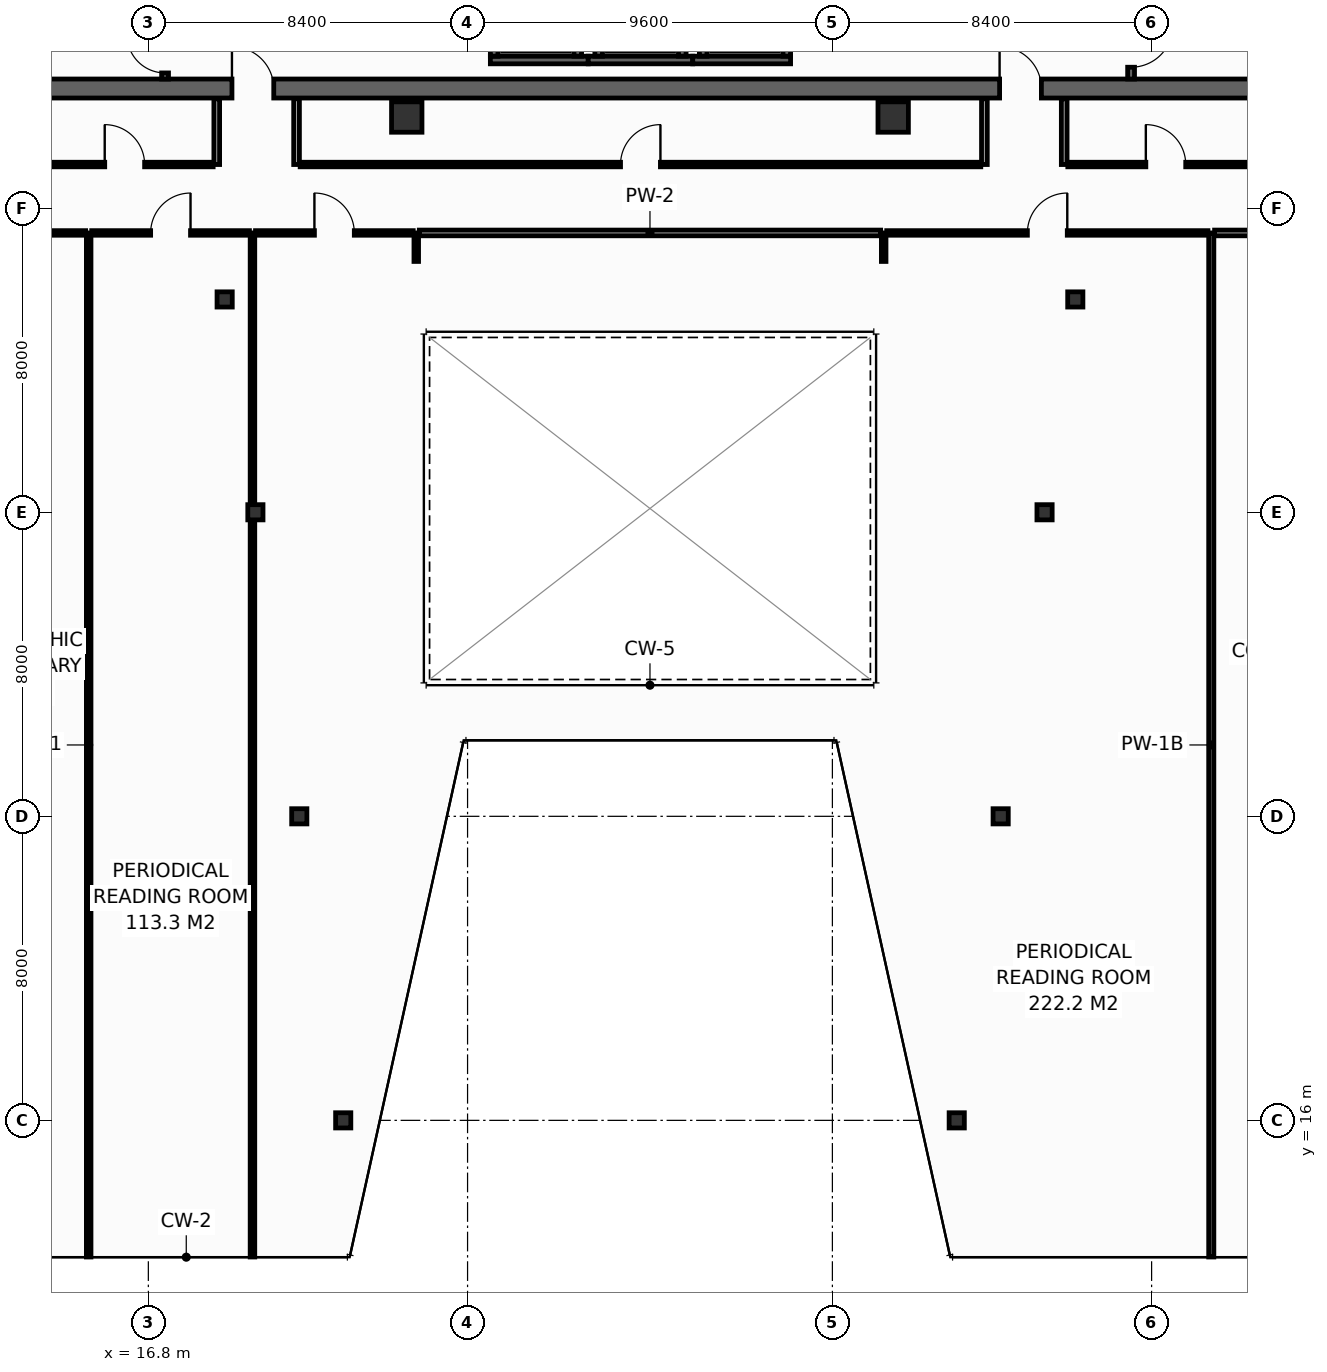
"""IFC4 building model, lengths in metres.
Left out: names, types, materials, properties, quantities, classifications, styles, units other than length and angle.
Written with IfcOpenShell. Run it as: python <this file> out.ifc"""

import sys

from ifc_helpers import new_model, si_unit, direction, frame, frame_2d, origin, origin_2d, place, context, subcontext, project, spatial, rectangle, hollow_rectangle, extrude, element, fill, save


model = new_model("IFC4")
c1 = context("Model", 3, precision=1e-05, world=origin(), true_north=direction((0.0, 1.0)))
c2 = subcontext(c1, "Body", "Model", "MODEL_VIEW")
j1 = project(units=[si_unit("LENGTHUNIT", "METRE"), si_unit("PLANEANGLEUNIT", "RADIAN")], contexts=[c1])
p1 = place(None, origin())
s1 = spatial("IfcSite", under=j1, at=p1, CompositionType="ELEMENT")
p2 = place(p1, origin())
s2 = spatial("IfcBuilding", under=s1, at=p2, CompositionType="ELEMENT")
p3 = place(p2, frame((0.0, 0.0, 198.0)))
s3 = spatial("IfcBuildingStorey", under=s2, at=p3, CompositionType="ELEMENT", Elevation=198.0)
p4 = place(p3, frame((13.6, 43.15, 0.0), z_axis=(0.0, 0.0, 1.0), x_axis=(1.0, 0.0, 0.0)))
e1 = element("IfcWall", 1, at=p4, inside=s3, PredefinedType="SHEAR", context=c2, shape_type="SweptSolid", body=[
    extrude(rectangle(XDim=32.7, YDim=0.5, at=frame_2d((16.35, 0.0))), origin(), (0.0, 0.0, 1.0), 3.55),
])
p5 = place(p4, frame((5.4, 0.0, 0.0)))
e2 = element("IfcOpeningElement", 2, at=p5, cuts=e1, PredefinedType="OPENING", context=c2, shape_type="SweptSolid", body=[
    extrude(rectangle(XDim=1.1, YDim=2.15, at=frame_2d((0.55, 1.075))), frame((0.0, 0.26, 0.0), z_axis=(0.0, -1.0, 0.0), x_axis=(1.0, 0.0, 0.0)), (0.0, 0.0, 1.0), 0.52),
])
p6 = place(p4, frame((25.6, 0.0, 0.0)))
e3 = element("IfcOpeningElement", 3, at=p6, cuts=e1, PredefinedType="OPENING", context=c2, shape_type="SweptSolid", body=[
    extrude(rectangle(XDim=1.1, YDim=2.15, at=frame_2d((0.55, 1.075))), frame((0.0, 0.26, 0.0), z_axis=(0.0, -1.0, 0.0), x_axis=(1.0, 0.0, 0.0)), (0.0, 0.0, 1.0), 0.52),
])
for number, where, z_axis, x_axis in (
    (4, (23.6, 42.4, 0.0), (0.0, 0.0, 1.0), (1.0, 0.0, 0.0)),
    (5, (36.4, 42.4, 0.0), (0.0, 0.0, 1.0), (1.0, 0.0, 0.0)),
):
    element("IfcColumn", number, at=place(p3, frame(where, z_axis=z_axis, x_axis=x_axis)), inside=s3, PredefinedType="COLUMN", context=c2, shape_type="SweptSolid", body=[
        extrude(hollow_rectangle(XDim=0.8, YDim=0.8, WallThickness=0.036, at=origin_2d()), origin(), (0.0, 0.0, 1.0), 3.8),
    ])
for number, where, z_axis, x_axis in (
    (6, (21.928, 16.0, 0.0), (0.0, 0.0, 1.0), (1.0, 0.0, 0.0)),
    (7, (38.072, 16.0, 0.0), (0.0, 0.0, 1.0), (1.0, 0.0, 0.0)),
    (8, (20.772, 24.0, 0.0), (0.0, 0.0, 1.0), (1.0, 0.0, 0.0)),
    (9, (39.228, 24.0, 0.0), (0.0, 0.0, 1.0), (1.0, 0.0, 0.0)),
    (10, (19.617, 32.0, 0.0), (0.0, 0.0, 1.0), (1.0, 0.0, 0.0)),
    (11, (40.383, 32.0, 0.0), (0.0, 0.0, 1.0), (1.0, 0.0, 0.0)),
    (12, (18.808, 37.6, 0.0), (0.0, 0.0, 1.0), (1.0, 0.0, 0.0)),
    (13, (41.192, 37.6, 0.0), (0.0, 0.0, 1.0), (1.0, 0.0, 0.0)),
):
    element("IfcColumn", number, at=place(p3, frame(where, z_axis=z_axis, x_axis=x_axis)), inside=s3, PredefinedType="COLUMN", context=c2, shape_type="SweptSolid", body=[
        extrude(hollow_rectangle(XDim=0.4, YDim=0.4, WallThickness=0.016, at=origin_2d()), origin(), (0.0, 0.0, 1.0), 3.8),
    ])
p7 = place(p3, frame((25.8, 43.9, 0.0), z_axis=(0.0, 0.0, 1.0), x_axis=(1.0, 0.0, 0.0)))
e14 = element("IfcWall", 14, at=p7, inside=s3, PredefinedType="SHEAR", context=c2, shape_type="SweptSolid", body=[
    extrude(rectangle(XDim=2.575, YDim=0.2, at=frame_2d((1.288, 0.0))), origin(), (0.0, 0.0, 1.0), 3.55),
])
for number, where, z_axis, x_axis in (
    (15, (25.9, 44.0, 0.0), (0.0, 0.0, 1.0), (0.0, 1.0, 0.0)),
    (16, (28.1, 44.0, 0.0), (0.0, 0.0, 1.0), (0.0, 1.0, 0.0)),
):
    element("IfcWall", number, at=place(p3, frame(where, z_axis=z_axis, x_axis=x_axis)), inside=s3, PredefinedType="SHEAR", context=c2, shape_type="SweptSolid", body=[
        extrude(rectangle(XDim=2.3, YDim=0.2, at=frame_2d((1.15, 0.0))), origin(), (0.0, 0.0, 1.0), 3.55),
    ])
p8 = place(p3, frame((28.375, 43.9, 0.0), z_axis=(0.0, 0.0, 1.0), x_axis=(1.0, 0.0, 0.0)))
e17 = element("IfcWall", 17, at=p8, inside=s3, PredefinedType="SHEAR", context=c2, shape_type="SweptSolid", body=[
    extrude(rectangle(XDim=2.75, YDim=0.2, at=frame_2d((1.375, 0.0))), origin(), (0.0, 0.0, 1.0), 3.55),
])
for number, where, z_axis, x_axis in (
    (18, (28.65, 44.0, 0.0), (0.0, 0.0, 1.0), (0.0, 1.0, 0.0)),
    (19, (30.85, 44.0, 0.0), (0.0, 0.0, 1.0), (0.0, 1.0, 0.0)),
):
    element("IfcWall", number, at=place(p3, frame(where, z_axis=z_axis, x_axis=x_axis)), inside=s3, PredefinedType="SHEAR", context=c2, shape_type="SweptSolid", body=[
        extrude(rectangle(XDim=2.3, YDim=0.2, at=frame_2d((1.15, 0.0))), origin(), (0.0, 0.0, 1.0), 3.55),
    ])
p9 = place(p3, frame((31.125, 43.9, 0.0), z_axis=(0.0, 0.0, 1.0), x_axis=(1.0, 0.0, 0.0)))
e20 = element("IfcWall", 20, at=p9, inside=s3, PredefinedType="SHEAR", context=c2, shape_type="SweptSolid", body=[
    extrude(rectangle(XDim=2.575, YDim=0.2, at=frame_2d((1.288, 0.0))), origin(), (0.0, 0.0, 1.0), 3.55),
])
for number, where, z_axis, x_axis in (
    (21, (31.4, 44.0, 0.0), (0.0, 0.0, 1.0), (0.0, 1.0, 0.0)),
    (22, (33.6, 44.0, 0.0), (0.0, 0.0, 1.0), (0.0, 1.0, 0.0)),
):
    element("IfcWall", number, at=place(p3, frame(where, z_axis=z_axis, x_axis=x_axis)), inside=s3, PredefinedType="SHEAR", context=c2, shape_type="SweptSolid", body=[
        extrude(rectangle(XDim=2.3, YDim=0.2, at=frame_2d((1.15, 0.0))), origin(), (0.0, 0.0, 1.0), 3.55),
    ])
p10 = place(p3, frame((17.24, 43.4, 0.0), z_axis=(0.0, 0.0, 1.0), x_axis=(0.0, 1.0, 0.0)))
e23 = element("IfcWall", 23, at=p10, inside=s3, PredefinedType="SHEAR", context=c2, shape_type="SweptSolid", body=[
    extrude(rectangle(XDim=10.4, YDim=0.18, at=frame_2d((5.2, 0.0))), origin(), (0.0, 0.0, 1.0), 3.55),
])
p11 = place(p10, frame((0.16, 0.0, 0.0)))
e24 = element("IfcOpeningElement", 24, at=p11, cuts=e23, PredefinedType="OPENING", context=c2, shape_type="SweptSolid", body=[
    extrude(rectangle(XDim=1.0, YDim=2.15, at=frame_2d((0.5, 1.075))), frame((0.0, 0.1, 0.0), z_axis=(0.0, -1.0, 0.0), x_axis=(1.0, 0.0, 0.0)), (0.0, 0.0, 1.0), 0.2),
])
p12 = place(p3, frame((42.66, 53.8, 0.0), z_axis=(0.0, 0.0, 1.0), x_axis=(0.0, -1.0, 0.0)))
e25 = element("IfcWall", 25, at=p12, inside=s3, PredefinedType="SHEAR", context=c2, shape_type="SweptSolid", body=[
    extrude(rectangle(XDim=10.4, YDim=0.18, at=frame_2d((5.2, 0.0))), origin(), (0.0, 0.0, 1.0), 3.55),
])
p13 = place(p12, frame((8.99, 0.0, 0.0)))
e26 = element("IfcOpeningElement", 26, at=p13, cuts=e25, PredefinedType="OPENING", context=c2, shape_type="SweptSolid", body=[
    extrude(rectangle(XDim=1.1, YDim=2.15, at=frame_2d((0.55, 1.075))), frame((0.0, 0.1, 0.0), z_axis=(0.0, -1.0, 0.0), x_axis=(1.0, 0.0, 0.0)), (0.0, 0.0, 1.0), 0.2),
])
for number, where, z_axis, x_axis in (
    (27, (18.6, 41.15, 0.0), (0.0, 0.0, 1.0), (0.0, 1.0, 0.0)),
    (28, (20.7, 41.15, 0.0), (0.0, 0.0, 1.0), (0.0, 1.0, 0.0)),
    (29, (38.8, 41.15, 0.0), (0.0, 0.0, 1.0), (0.0, 1.0, 0.0)),
    (30, (40.9, 41.15, 0.0), (0.0, 0.0, 1.0), (0.0, 1.0, 0.0)),
):
    element("IfcWall", number, at=place(p3, frame(where, z_axis=z_axis, x_axis=x_axis)), inside=s3, PredefinedType="PARTITIONING", context=c2, shape_type="SweptSolid", body=[
        extrude(rectangle(XDim=1.73, YDim=0.15, at=frame_2d((0.865, 0.0))), origin(), (0.0, 0.0, 1.0), 3.55),
    ])
p14 = place(p3, frame((13.85, 41.15, 0.0), z_axis=(0.0, 0.0, 1.0), x_axis=(1.0, 0.0, 0.0)))
e31 = element("IfcWall", 31, at=p14, inside=s3, PredefinedType="PARTITIONING", context=c2, shape_type="SweptSolid", body=[
    extrude(rectangle(XDim=4.655, YDim=0.12, at=frame_2d((2.327, 0.0))), origin(), (0.0, 0.0, 1.0), 3.55),
])
p15 = place(p14, frame((1.802, 0.0, 0.0)))
e32 = element("IfcOpeningElement", 32, at=p15, cuts=e31, PredefinedType="OPENING", context=c2, shape_type="SweptSolid", body=[
    extrude(rectangle(XDim=1.05, YDim=2.15, at=frame_2d((0.525, 1.075))), frame((0.0, 0.07, 0.0), z_axis=(0.0, -1.0, 0.0), x_axis=(1.0, 0.0, 0.0)), (0.0, 0.0, 1.0), 0.14),
])
p16 = place(p3, frame((20.795, 41.15, 0.0), z_axis=(0.0, 0.0, 1.0), x_axis=(1.0, 0.0, 0.0)))
e33 = element("IfcWall", 33, at=p16, inside=s3, PredefinedType="PARTITIONING", context=c2, shape_type="SweptSolid", body=[
    extrude(rectangle(XDim=17.91, YDim=0.12, at=frame_2d((8.955, 0.0))), origin(), (0.0, 0.0, 1.0), 2.835),
])
p17 = place(p16, frame((8.43, 0.0, 0.0)))
e34 = element("IfcOpeningElement", 34, at=p17, cuts=e33, PredefinedType="OPENING", context=c2, shape_type="SweptSolid", body=[
    extrude(rectangle(XDim=1.05, YDim=2.15, at=frame_2d((0.525, 1.075))), frame((0.0, 0.07, 0.0), z_axis=(0.0, -1.0, 0.0), x_axis=(1.0, 0.0, 0.0)), (0.0, 0.0, 1.0), 0.14),
])
p18 = place(p3, frame((40.995, 41.15, 0.0), z_axis=(0.0, 0.0, 1.0), x_axis=(1.0, 0.0, 0.0)))
e35 = element("IfcWall", 35, at=p18, inside=s3, PredefinedType="PARTITIONING", context=c2, shape_type="SweptSolid", body=[
    extrude(rectangle(XDim=5.155, YDim=0.12, at=frame_2d((2.577, 0.0))), origin(), (0.0, 0.0, 1.0), 3.55),
])
p19 = place(p18, frame((2.053, 0.0, 0.0)))
e36 = element("IfcOpeningElement", 36, at=p19, cuts=e35, PredefinedType="OPENING", context=c2, shape_type="SweptSolid", body=[
    extrude(rectangle(XDim=1.05, YDim=2.15, at=frame_2d((0.525, 1.075))), frame((0.0, 0.07, 0.0), z_axis=(0.0, -1.0, 0.0), x_axis=(1.0, 0.0, 0.0)), (0.0, 0.0, 1.0), 0.14),
])
for number, where, z_axis, x_axis in (
    (37, (15.23, 12.405, 0.0), (0.0, 0.0, 1.0), (0.0, 1.0, 0.0)),
    (38, (19.54, 12.405, 0.0), (0.0, 0.0, 1.0), (0.0, 1.0, 0.0)),
):
    element("IfcWall", number, at=place(p3, frame(where, z_axis=z_axis, x_axis=x_axis)), inside=s3, PredefinedType="PARTITIONING", context=c2, shape_type="SweptSolid", body=[
        extrude(rectangle(XDim=26.945, YDim=0.12, at=frame_2d((13.473, 0.0))), origin(), (0.0, 0.0, 1.0), 2.835),
    ])
p20 = place(p3, frame((44.77, 12.405, 0.0), z_axis=(0.0, 0.0, 1.0), x_axis=(0.0, 1.0, 0.0)))
e39 = element("IfcWall", 39, at=p20, inside=s3, PredefinedType="PARTITIONING", context=c2, shape_type="SweptSolid", body=[
    extrude(rectangle(XDim=26.945, YDim=0.135, at=frame_2d((13.473, 0.0))), origin(), (0.0, 0.0, 1.0), 2.835),
])
for number, where, z_axis, x_axis in (
    (40, (23.85, 38.6, 0.0), (0.0, 0.0, 1.0), (0.0, 1.0, 0.0)),
    (41, (36.15, 38.6, 0.0), (0.0, 0.0, 1.0), (0.0, 1.0, 0.0)),
):
    element("IfcWall", number, at=place(p3, frame(where, z_axis=z_axis, x_axis=x_axis)), inside=s3, PredefinedType="PARTITIONING", context=c2, shape_type="SweptSolid", body=[
        extrude(rectangle(XDim=0.75, YDim=0.12, at=frame_2d((0.375, 0.0))), origin(), (0.0, 0.0, 1.0), 3.55),
    ])
p21 = place(p3, frame((11.0, 39.35, 0.0), z_axis=(0.0, 0.0, 1.0), x_axis=(1.0, 0.0, 0.0)))
e42 = element("IfcWall", 42, at=p21, inside=s3, PredefinedType="PARTITIONING", context=c2, shape_type="SweptSolid", body=[
    extrude(rectangle(XDim=4.15, YDim=0.12, at=frame_2d((2.075, 0.0))), origin(), (0.0, 0.0, 1.0), 3.55),
])
p22 = place(p21, frame((1.55, 0.0, 0.0)))
e43 = element("IfcOpeningElement", 43, at=p22, cuts=e42, PredefinedType="OPENING", context=c2, shape_type="SweptSolid", body=[
    extrude(rectangle(XDim=1.05, YDim=2.15, at=frame_2d((0.525, 1.075))), frame((0.0, 0.07, 0.0), z_axis=(0.0, -1.0, 0.0), x_axis=(1.0, 0.0, 0.0)), (0.0, 0.0, 1.0), 0.14),
])
p23 = place(p3, frame((15.31, 39.35, 0.0), z_axis=(0.0, 0.0, 1.0), x_axis=(1.0, 0.0, 0.0)))
e44 = element("IfcWall", 44, at=p23, inside=s3, PredefinedType="PARTITIONING", context=c2, shape_type="SweptSolid", body=[
    extrude(rectangle(XDim=4.15, YDim=0.12, at=frame_2d((2.075, 0.0))), origin(), (0.0, 0.0, 1.0), 3.55),
])
p24 = place(p23, frame((1.55, 0.0, 0.0)))
e45 = element("IfcOpeningElement", 45, at=p24, cuts=e44, PredefinedType="OPENING", context=c2, shape_type="SweptSolid", body=[
    extrude(rectangle(XDim=1.05, YDim=2.15, at=frame_2d((0.525, 1.075))), frame((0.0, 0.07, 0.0), z_axis=(0.0, -1.0, 0.0), x_axis=(1.0, 0.0, 0.0)), (0.0, 0.0, 1.0), 0.14),
])
p25 = place(p3, frame((19.62, 39.35, 0.0), z_axis=(0.0, 0.0, 1.0), x_axis=(1.0, 0.0, 0.0)))
e46 = element("IfcWall", 46, at=p25, inside=s3, PredefinedType="PARTITIONING", context=c2, shape_type="SweptSolid", body=[
    extrude(rectangle(XDim=4.15, YDim=0.12, at=frame_2d((2.075, 0.0))), origin(), (0.0, 0.0, 1.0), 2.835),
])
p26 = place(p25, frame((1.55, 0.0, 0.0)))
e47 = element("IfcOpeningElement", 47, at=p26, cuts=e46, PredefinedType="OPENING", context=c2, shape_type="SweptSolid", body=[
    extrude(rectangle(XDim=1.05, YDim=2.15, at=frame_2d((0.525, 1.075))), frame((0.0, 0.07, 0.0), z_axis=(0.0, -1.0, 0.0), x_axis=(1.0, 0.0, 0.0)), (0.0, 0.0, 1.0), 0.14),
])
p27 = place(p3, frame((23.93, 39.35, 0.0), z_axis=(0.0, 0.0, 1.0), x_axis=(1.0, 0.0, 0.0)))
e48 = element("IfcWall", 48, at=p27, inside=s3, PredefinedType="PARTITIONING", context=c2, shape_type="SweptSolid", body=[
    extrude(rectangle(XDim=12.14, YDim=0.15, at=frame_2d((6.07, 0.0))), origin(), (0.0, 0.0, 1.0), 3.55),
])
p28 = place(p3, frame((36.23, 39.35, 0.0), z_axis=(0.0, 0.0, 1.0), x_axis=(1.0, 0.0, 0.0)))
e49 = element("IfcWall", 49, at=p28, inside=s3, PredefinedType="PARTITIONING", context=c2, shape_type="SweptSolid", body=[
    extrude(rectangle(XDim=8.453, YDim=0.12, at=frame_2d((4.226, 0.0))), origin(), (0.0, 0.0, 1.0), 2.835),
])
p29 = place(p28, frame((3.701, 0.0, 0.0)))
e50 = element("IfcOpeningElement", 50, at=p29, cuts=e49, PredefinedType="OPENING", context=c2, shape_type="SweptSolid", body=[
    extrude(rectangle(XDim=1.05, YDim=2.15, at=frame_2d((0.525, 1.075))), frame((0.0, 0.07, 0.0), z_axis=(0.0, -1.0, 0.0), x_axis=(1.0, 0.0, 0.0)), (0.0, 0.0, 1.0), 0.14),
])
p30 = place(p3, frame((44.857, 39.35, 0.0), z_axis=(0.0, 0.0, 1.0), x_axis=(1.0, 0.0, 0.0)))
e51 = element("IfcWall", 51, at=p30, inside=s3, PredefinedType="PARTITIONING", context=c2, shape_type="SweptSolid", body=[
    extrude(rectangle(XDim=8.838, YDim=0.15, at=frame_2d((4.419, 0.0))), origin(), (0.0, 0.0, 1.0), 3.035),
])
p31 = place(p30, frame((3.894, 0.0, 0.0)))
e52 = element("IfcOpeningElement", 52, at=p31, cuts=e51, PredefinedType="OPENING", context=c2, shape_type="SweptSolid", body=[
    extrude(rectangle(XDim=1.05, YDim=2.15, at=frame_2d((0.525, 1.075))), frame((0.0, 0.085, 0.0), z_axis=(0.0, -1.0, 0.0), x_axis=(1.0, 0.0, 0.0)), (0.0, 0.0, 1.0), 0.17),
])
p32 = place(p11, origin())
e53 = element("IfcDoor", 53, at=p32, inside=s3, OperationType="SINGLE_SWING_RIGHT", PredefinedType="DOOR", context=c2, shape_type="SweptSolid", body=[
    extrude(rectangle(XDim=1.0, YDim=2.15, at=frame_2d((0.5, 1.075))), frame((0.0, 0.025, 0.0), z_axis=(0.0, -1.0, 0.0), x_axis=(1.0, 0.0, 0.0)), (0.0, 0.0, 1.0), 0.05),
])
fill(e24, e53)
p33 = place(p13, origin())
e54 = element("IfcDoor", 54, at=p33, inside=s3, OperationType="SINGLE_SWING_LEFT", PredefinedType="DOOR", context=c2, shape_type="SweptSolid", body=[
    extrude(rectangle(XDim=1.1, YDim=2.15, at=frame_2d((0.55, 1.075))), frame((0.0, 0.025, 0.0), z_axis=(0.0, -1.0, 0.0), x_axis=(1.0, 0.0, 0.0)), (0.0, 0.0, 1.0), 0.05),
])
fill(e26, e54)
p34 = place(p5, origin())
e55 = element("IfcDoor", 55, at=p34, inside=s3, OperationType="SINGLE_SWING_LEFT", PredefinedType="DOOR", context=c2, shape_type="SweptSolid", body=[
    extrude(rectangle(XDim=1.1, YDim=2.15, at=frame_2d((0.55, 1.075))), frame((0.0, 0.025, 0.0), z_axis=(0.0, -1.0, 0.0), x_axis=(1.0, 0.0, 0.0)), (0.0, 0.0, 1.0), 0.05),
])
fill(e2, e55)
p35 = place(p6, origin())
e56 = element("IfcDoor", 56, at=p35, inside=s3, OperationType="SINGLE_SWING_LEFT", PredefinedType="DOOR", context=c2, shape_type="SweptSolid", body=[
    extrude(rectangle(XDim=1.1, YDim=2.15, at=frame_2d((0.55, 1.075))), frame((0.0, 0.025, 0.0), z_axis=(0.0, -1.0, 0.0), x_axis=(1.0, 0.0, 0.0)), (0.0, 0.0, 1.0), 0.05),
])
fill(e3, e56)
p36 = place(p15, origin())
e57 = element("IfcDoor", 57, at=p36, inside=s3, OperationType="SINGLE_SWING_LEFT", PredefinedType="DOOR", context=c2, shape_type="SweptSolid", body=[
    extrude(rectangle(XDim=1.05, YDim=2.15, at=frame_2d((0.525, 1.075))), frame((0.0, 0.025, 0.0), z_axis=(0.0, -1.0, 0.0), x_axis=(1.0, 0.0, 0.0)), (0.0, 0.0, 1.0), 0.05),
])
fill(e32, e57)
p37 = place(p17, origin())
e58 = element("IfcDoor", 58, at=p37, inside=s3, OperationType="SINGLE_SWING_RIGHT", PredefinedType="DOOR", context=c2, shape_type="SweptSolid", body=[
    extrude(rectangle(XDim=1.05, YDim=2.15, at=frame_2d((0.525, 1.075))), frame((0.0, 0.025, 0.0), z_axis=(0.0, -1.0, 0.0), x_axis=(1.0, 0.0, 0.0)), (0.0, 0.0, 1.0), 0.05),
])
fill(e34, e58)
p38 = place(p19, origin())
e59 = element("IfcDoor", 59, at=p38, inside=s3, OperationType="SINGLE_SWING_LEFT", PredefinedType="DOOR", context=c2, shape_type="SweptSolid", body=[
    extrude(rectangle(XDim=1.05, YDim=2.15, at=frame_2d((0.525, 1.075))), frame((0.0, 0.025, 0.0), z_axis=(0.0, -1.0, 0.0), x_axis=(1.0, 0.0, 0.0)), (0.0, 0.0, 1.0), 0.05),
])
fill(e36, e59)
p39 = place(p24, origin())
e60 = element("IfcDoor", 60, at=p39, inside=s3, OperationType="SINGLE_SWING_RIGHT", PredefinedType="DOOR", context=c2, shape_type="SweptSolid", body=[
    extrude(rectangle(XDim=1.05, YDim=2.15, at=frame_2d((0.525, 1.075))), frame((0.0, 0.025, 0.0), z_axis=(0.0, -1.0, 0.0), x_axis=(1.0, 0.0, 0.0)), (0.0, 0.0, 1.0), 0.05),
])
fill(e45, e60)
p40 = place(p26, origin())
e61 = element("IfcDoor", 61, at=p40, inside=s3, OperationType="SINGLE_SWING_LEFT", PredefinedType="DOOR", context=c2, shape_type="SweptSolid", body=[
    extrude(rectangle(XDim=1.05, YDim=2.15, at=frame_2d((0.525, 1.075))), frame((0.0, 0.025, 0.0), z_axis=(0.0, -1.0, 0.0), x_axis=(1.0, 0.0, 0.0)), (0.0, 0.0, 1.0), 0.05),
])
fill(e47, e61)
p41 = place(p29, origin())
e62 = element("IfcDoor", 62, at=p41, inside=s3, OperationType="SINGLE_SWING_RIGHT", PredefinedType="DOOR", context=c2, shape_type="SweptSolid", body=[
    extrude(rectangle(XDim=1.05, YDim=2.15, at=frame_2d((0.525, 1.075))), frame((0.0, 0.025, 0.0), z_axis=(0.0, -1.0, 0.0), x_axis=(1.0, 0.0, 0.0)), (0.0, 0.0, 1.0), 0.05),
])
fill(e50, e62)
save(model, sys.argv[1])
